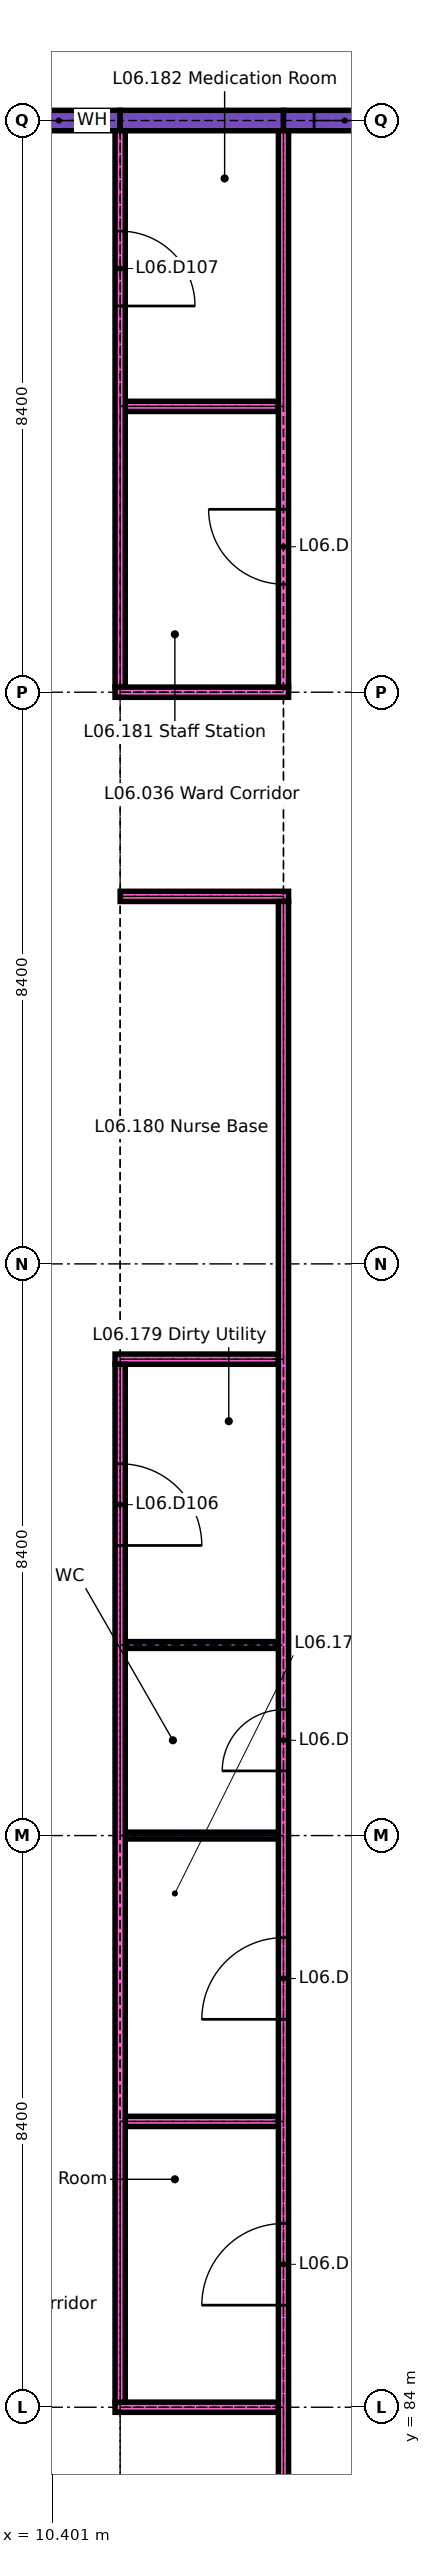
"""IFC4 building model, lengths in metres.
Left out: names, types, materials, properties, quantities, classifications, styles, units other than length and angle.
Written with IfcOpenShell. Run it as: python <this file> out.ifc"""

import sys

from ifc_helpers import new_model, si_unit, direction, frame, frame_2d, origin, place, context, subcontext, project, spatial, rectangle, extrude, element, fill, save


model = new_model("IFC4")
c1 = context("Model", 3, precision=1e-05, world=origin(), true_north=direction((0.0, 1.0)))
c2 = subcontext(c1, "Body", "Model", "MODEL_VIEW")
j1 = project(units=[si_unit("LENGTHUNIT", "METRE"), si_unit("PLANEANGLEUNIT", "RADIAN")], contexts=[c1])
p1 = place(None, origin())
s1 = spatial("IfcSite", under=j1, at=p1, CompositionType="ELEMENT")
p2 = place(p1, origin())
s2 = spatial("IfcBuilding", under=s1, at=p2, CompositionType="ELEMENT")
p3 = place(p2, frame((0.0, 0.0, 26.1)))
s3 = spatial("IfcBuildingStorey", under=s2, at=p3, CompositionType="ELEMENT", Elevation=26.1)
p4 = place(p3, frame((8.75, 117.6, 0.0), z_axis=(0.0, 0.0, 1.0), x_axis=(1.0, 0.0, 0.0)))
e1 = element("IfcWall", 1, at=p4, inside=s3, PredefinedType="SOLIDWALL", context=c2, shape_type="SweptSolid", body=[
    extrude(rectangle(XDim=2.65, YDim=0.3, at=frame_2d((1.325, 0.0))), origin(), (0.0, 0.0, 1.0), 3.3),
])
p5 = place(p4, frame((1.3, 0.0, 0.9)))
e2 = element("IfcOpeningElement", 2, at=p5, cuts=e1, PredefinedType="OPENING", context=c2, shape_type="SweptSolid", body=[
    extrude(rectangle(XDim=0.9, YDim=1.5, at=frame_2d((0.45, 0.75))), frame((0.0, 0.16, 0.0), z_axis=(0.0, -1.0, 0.0), x_axis=(1.0, 0.0, 0.0)), (0.0, 0.0, 1.0), 0.32),
])
p6 = place(p3, frame((11.4, 117.6, 0.0), z_axis=(0.0, 0.0, 1.0), x_axis=(1.0, 0.0, 0.0)))
e3 = element("IfcWall", 3, at=p6, inside=s3, PredefinedType="SOLIDWALL", context=c2, shape_type="SweptSolid", body=[
    extrude(rectangle(XDim=2.4, YDim=0.3, at=frame_2d((1.2, 0.0))), origin(), (0.0, 0.0, 1.0), 3.3),
])
p7 = place(p3, frame((13.8, 117.6, 0.0), z_axis=(0.0, 0.0, 1.0), x_axis=(1.0, 0.0, 0.0)))
e4 = element("IfcWall", 4, at=p7, inside=s3, PredefinedType="SOLIDWALL", context=c2, shape_type="SweptSolid", body=[
    extrude(rectangle(XDim=3.0, YDim=0.3, at=frame_2d((1.5, 0.0))), origin(), (0.0, 0.0, 1.0), 3.3),
])
p8 = place(p7, frame((0.45, 0.0, 0.9)))
e5 = element("IfcOpeningElement", 5, at=p8, cuts=e4, PredefinedType="OPENING", context=c2, shape_type="SweptSolid", body=[
    extrude(rectangle(XDim=0.9, YDim=1.5, at=frame_2d((0.45, 0.75))), frame((0.0, 0.16, 0.0), z_axis=(0.0, -1.0, 0.0), x_axis=(1.0, 0.0, 0.0)), (0.0, 0.0, 1.0), 0.32),
])
p9 = place(p3, frame((11.325, 84.0, 0.0), z_axis=(0.0, 0.0, 1.0), x_axis=(1.0, 0.0, 0.0)))
e6 = element("IfcWall", 6, at=p9, inside=s3, PredefinedType="PARTITIONING", context=c2, shape_type="SweptSolid", body=[
    extrude(rectangle(XDim=2.4, YDim=0.15, at=frame_2d((1.2, 0.0))), origin(), (0.0, 0.0, 1.0), 3.3),
])
p10 = place(p3, frame((11.475, 88.2, 0.0), z_axis=(0.0, 0.0, 1.0), x_axis=(1.0, 0.0, 0.0)))
e7 = element("IfcWall", 7, at=p10, inside=s3, PredefinedType="PARTITIONING", context=c2, shape_type="SweptSolid", body=[
    extrude(rectangle(XDim=2.25, YDim=0.15, at=frame_2d((1.125, 0.0))), origin(), (0.0, 0.0, 1.0), 3.3),
])
for number, where, z_axis, x_axis in (
    (8, (11.475, 92.4, 0.0), (0.0, 0.0, 1.0), (1.0, 0.0, 0.0)),
    (9, (11.475, 95.2, 0.0), (0.0, 0.0, 1.0), (1.0, 0.0, 0.0)),
):
    element("IfcWall", number, at=place(p3, frame(where, z_axis=z_axis, x_axis=x_axis)), inside=s3, PredefinedType="PARTITIONING", context=c2, shape_type="SweptSolid", body=[
        extrude(rectangle(XDim=2.25, YDim=0.1, at=frame_2d((1.125, 0.0))), origin(), (0.0, 0.0, 1.0), 3.3),
    ])
p11 = place(p3, frame((11.325, 99.4, 0.0), z_axis=(0.0, 0.0, 1.0), x_axis=(1.0, 0.0, 0.0)))
e10 = element("IfcWall", 10, at=p11, inside=s3, PredefinedType="PARTITIONING", context=c2, shape_type="SweptSolid", body=[
    extrude(rectangle(XDim=2.4, YDim=0.15, at=frame_2d((1.2, 0.0))), origin(), (0.0, 0.0, 1.0), 3.3),
])
p12 = place(p3, frame((11.4, 106.2, 0.0), z_axis=(0.0, 0.0, 1.0), x_axis=(1.0, 0.0, 0.0)))
e11 = element("IfcWall", 11, at=p12, inside=s3, PredefinedType="PARTITIONING", context=c2, shape_type="SweptSolid", body=[
    extrude(rectangle(XDim=2.475, YDim=0.15, at=frame_2d((1.238, 0.0))), origin(), (0.0, 0.0, 1.0), 3.3),
])
p13 = place(p3, frame((11.325, 109.2, 0.0), z_axis=(0.0, 0.0, 1.0), x_axis=(1.0, 0.0, 0.0)))
e12 = element("IfcWall", 12, at=p13, inside=s3, PredefinedType="PARTITIONING", context=c2, shape_type="SweptSolid", body=[
    extrude(rectangle(XDim=2.55, YDim=0.15, at=frame_2d((1.275, 0.0))), origin(), (0.0, 0.0, 1.0), 3.3),
])
p14 = place(p3, frame((11.475, 113.4, 0.0), z_axis=(0.0, 0.0, 1.0), x_axis=(1.0, 0.0, 0.0)))
e13 = element("IfcWall", 13, at=p14, inside=s3, PredefinedType="PARTITIONING", context=c2, shape_type="SweptSolid", body=[
    extrude(rectangle(XDim=2.25, YDim=0.15, at=frame_2d((1.125, 0.0))), origin(), (0.0, 0.0, 1.0), 3.3),
])
p15 = place(p3, frame((11.4, 84.075, 0.0), z_axis=(0.0, 0.0, 1.0), x_axis=(0.0, 1.0, 0.0)))
e14 = element("IfcWall", 14, at=p15, inside=s3, PredefinedType="PARTITIONING", context=c2, shape_type="SweptSolid", body=[
    extrude(rectangle(XDim=15.25, YDim=0.15, at=frame_2d((7.625, 0.0))), origin(), (0.0, 0.0, 1.0), 3.3),
])
p16 = place(p15, frame((12.587, 0.0, 0.0)))
e15 = element("IfcOpeningElement", 15, at=p16, cuts=e14, PredefinedType="OPENING", context=c2, shape_type="SweptSolid", body=[
    extrude(rectangle(XDim=1.2, YDim=2.1, at=frame_2d((0.6, 1.05))), frame((0.0, 0.085, 0.0), z_axis=(0.0, -1.0, 0.0), x_axis=(1.0, 0.0, 0.0)), (0.0, 0.0, 1.0), 0.17),
])
p17 = place(p3, frame((11.4, 109.275, 0.0), z_axis=(0.0, 0.0, 1.0), x_axis=(0.0, 1.0, 0.0)))
e16 = element("IfcWall", 16, at=p17, inside=s3, PredefinedType="PARTITIONING", context=c2, shape_type="SweptSolid", body=[
    extrude(rectangle(XDim=8.175, YDim=0.15, at=frame_2d((4.087, 0.0))), origin(), (0.0, 0.0, 1.0), 3.3),
])
p18 = place(p17, frame((5.6, 0.0, 0.0)))
e17 = element("IfcOpeningElement", 17, at=p18, cuts=e16, PredefinedType="OPENING", context=c2, shape_type="SweptSolid", body=[
    extrude(rectangle(XDim=1.1, YDim=2.1, at=frame_2d((0.55, 1.05))), frame((0.0, 0.085, 0.0), z_axis=(0.0, -1.0, 0.0), x_axis=(1.0, 0.0, 0.0)), (0.0, 0.0, 1.0), 0.17),
])
p19 = place(p3, frame((13.8, 75.7, 0.0), z_axis=(0.0, 0.0, 1.0), x_axis=(0.0, 1.0, 0.0)))
e18 = element("IfcWall", 18, at=p19, inside=s3, PredefinedType="PARTITIONING", context=c2, shape_type="SweptSolid", body=[
    extrude(rectangle(XDim=30.425, YDim=0.15, at=frame_2d((15.212, 0.0))), origin(), (0.0, 0.0, 1.0), 3.3),
])
p20 = place(p19, frame((9.8, 0.0, 0.0)))
e19 = element("IfcOpeningElement", 19, at=p20, cuts=e18, PredefinedType="OPENING", context=c2, shape_type="SweptSolid", body=[
    extrude(rectangle(XDim=1.2, YDim=2.1, at=frame_2d((0.6, 1.05))), frame((0.0, 0.085, 0.0), z_axis=(0.0, -1.0, 0.0), x_axis=(1.0, 0.0, 0.0)), (0.0, 0.0, 1.0), 0.17),
])
p21 = place(p19, frame((14.0, 0.0, 0.0)))
e20 = element("IfcOpeningElement", 20, at=p21, cuts=e18, PredefinedType="OPENING", context=c2, shape_type="SweptSolid", body=[
    extrude(rectangle(XDim=1.2, YDim=2.1, at=frame_2d((0.6, 1.05))), frame((0.0, 0.085, 0.0), z_axis=(0.0, -1.0, 0.0), x_axis=(1.0, 0.0, 0.0)), (0.0, 0.0, 1.0), 0.17),
])
p22 = place(p19, frame((17.65, 0.0, 0.0)))
e21 = element("IfcOpeningElement", 21, at=p22, cuts=e18, PredefinedType="OPENING", context=c2, shape_type="SweptSolid", body=[
    extrude(rectangle(XDim=0.9, YDim=2.1, at=frame_2d((0.45, 1.05))), frame((0.0, 0.085, 0.0), z_axis=(0.0, -1.0, 0.0), x_axis=(1.0, 0.0, 0.0)), (0.0, 0.0, 1.0), 0.17),
])
p23 = place(p3, frame((13.8, 109.275, 0.0), z_axis=(0.0, 0.0, 1.0), x_axis=(0.0, 1.0, 0.0)))
e22 = element("IfcWall", 22, at=p23, inside=s3, PredefinedType="PARTITIONING", context=c2, shape_type="SweptSolid", body=[
    extrude(rectangle(XDim=8.175, YDim=0.15, at=frame_2d((4.087, 0.0))), origin(), (0.0, 0.0, 1.0), 3.3),
])
p24 = place(p23, frame((1.512, 0.0, 0.0)))
e23 = element("IfcOpeningElement", 23, at=p24, cuts=e22, PredefinedType="OPENING", context=c2, shape_type="SweptSolid", body=[
    extrude(rectangle(XDim=1.1, YDim=2.1, at=frame_2d((0.55, 1.05))), frame((0.0, 0.085, 0.0), z_axis=(0.0, -1.0, 0.0), x_axis=(1.0, 0.0, 0.0)), (0.0, 0.0, 1.0), 0.17),
])
p25 = place(p5, origin())
e24 = element("IfcWindow", 24, at=p25, inside=s3, PartitioningType="SINGLE_PANEL", PredefinedType="WINDOW", context=c2, shape_type="SweptSolid", body=[
    extrude(rectangle(XDim=0.9, YDim=1.5, at=frame_2d((0.45, 0.75))), frame((0.0, 0.03, 0.0), z_axis=(0.0, -1.0, 0.0), x_axis=(1.0, 0.0, 0.0)), (0.0, 0.0, 1.0), 0.06),
])
fill(e2, e24)
p26 = place(p8, origin())
e25 = element("IfcWindow", 25, at=p26, inside=s3, PartitioningType="SINGLE_PANEL", PredefinedType="WINDOW", context=c2, shape_type="SweptSolid", body=[
    extrude(rectangle(XDim=0.9, YDim=1.5, at=frame_2d((0.45, 0.75))), frame((0.0, 0.03, 0.0), z_axis=(0.0, -1.0, 0.0), x_axis=(1.0, 0.0, 0.0)), (0.0, 0.0, 1.0), 0.06),
])
fill(e5, e25)
p27 = place(p16, origin())
e26 = element("IfcDoor", 26, at=p27, inside=s3, OperationType="SINGLE_SWING_LEFT", PredefinedType="DOOR", context=c2, shape_type="SweptSolid", body=[
    extrude(rectangle(XDim=1.2, YDim=2.1, at=frame_2d((0.6, 1.05))), frame((0.0, 0.025, 0.0), z_axis=(0.0, -1.0, 0.0), x_axis=(1.0, 0.0, 0.0)), (0.0, 0.0, 1.0), 0.05),
])
fill(e15, e26)
p28 = place(p18, origin())
e27 = element("IfcDoor", 27, at=p28, inside=s3, OperationType="SINGLE_SWING_LEFT", PredefinedType="DOOR", context=c2, shape_type="SweptSolid", body=[
    extrude(rectangle(XDim=1.1, YDim=2.1, at=frame_2d((0.55, 1.05))), frame((0.0, 0.025, 0.0), z_axis=(0.0, -1.0, 0.0), x_axis=(1.0, 0.0, 0.0)), (0.0, 0.0, 1.0), 0.05),
])
fill(e17, e27)
p29 = place(p20, origin())
e28 = element("IfcDoor", 28, at=p29, inside=s3, OperationType="SINGLE_SWING_RIGHT", PredefinedType="DOOR", context=c2, shape_type="SweptSolid", body=[
    extrude(rectangle(XDim=1.2, YDim=2.1, at=frame_2d((0.6, 1.05))), frame((0.0, 0.025, 0.0), z_axis=(0.0, -1.0, 0.0), x_axis=(1.0, 0.0, 0.0)), (0.0, 0.0, 1.0), 0.05),
])
fill(e19, e28)
p30 = place(p21, origin())
e29 = element("IfcDoor", 29, at=p30, inside=s3, OperationType="SINGLE_SWING_RIGHT", PredefinedType="DOOR", context=c2, shape_type="SweptSolid", body=[
    extrude(rectangle(XDim=1.2, YDim=2.1, at=frame_2d((0.6, 1.05))), frame((0.0, 0.025, 0.0), z_axis=(0.0, -1.0, 0.0), x_axis=(1.0, 0.0, 0.0)), (0.0, 0.0, 1.0), 0.05),
])
fill(e20, e29)
p31 = place(p22, origin())
e30 = element("IfcDoor", 30, at=p31, inside=s3, OperationType="SINGLE_SWING_RIGHT", PredefinedType="DOOR", context=c2, shape_type="SweptSolid", body=[
    extrude(rectangle(XDim=0.9, YDim=2.1, at=frame_2d((0.45, 1.05))), frame((0.0, 0.02, 0.0), z_axis=(0.0, -1.0, 0.0), x_axis=(1.0, 0.0, 0.0)), (0.0, 0.0, 1.0), 0.04),
])
fill(e21, e30)
p32 = place(p24, origin())
e31 = element("IfcDoor", 31, at=p32, inside=s3, OperationType="SINGLE_SWING_LEFT", PredefinedType="DOOR", context=c2, shape_type="SweptSolid", body=[
    extrude(rectangle(XDim=1.1, YDim=2.1, at=frame_2d((0.55, 1.05))), frame((0.0, 0.025, 0.0), z_axis=(0.0, -1.0, 0.0), x_axis=(1.0, 0.0, 0.0)), (0.0, 0.0, 1.0), 0.05),
])
fill(e23, e31)
save(model, sys.argv[1])
